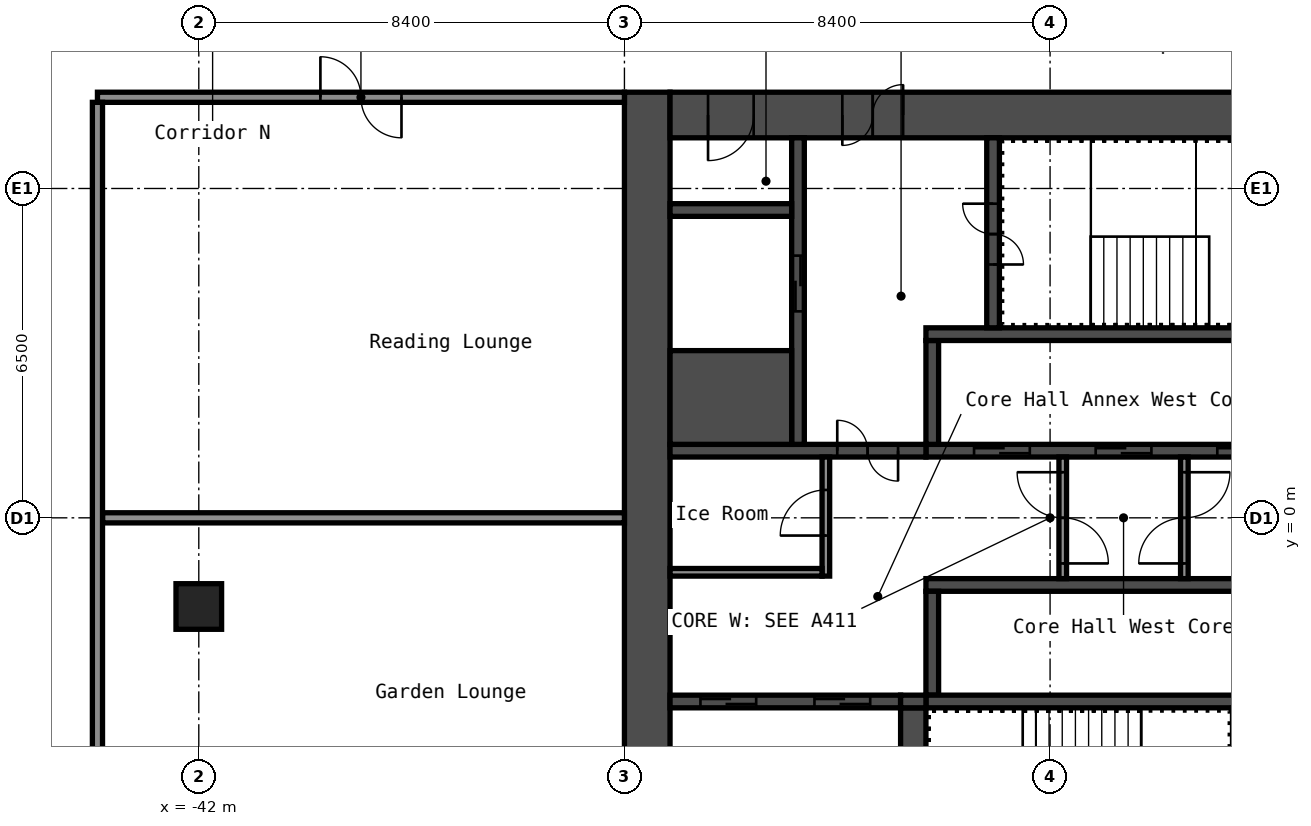
"""IFC4 building model, lengths in metres.
Left out: names, types, materials, properties, quantities, classifications, styles, units other than length and angle.
Written with IfcOpenShell. Run it as: python <this file> out.ifc"""

import sys

from ifc_helpers import new_model, si_unit, direction, frame, frame_2d, origin, origin_2d, place, context, subcontext, project, spatial, rectangle, hollow_rectangle, extrude, element, fill, save


model = new_model("IFC4")
c1 = context("Model", 3, precision=1e-05, world=origin(), true_north=direction((0.0, 1.0)))
c2 = subcontext(c1, "Body", "Model", "MODEL_VIEW")
j1 = project(units=[si_unit("LENGTHUNIT", "METRE"), si_unit("PLANEANGLEUNIT", "RADIAN")], contexts=[c1])
p1 = place(None, origin())
s1 = spatial("IfcSite", under=j1, at=p1, CompositionType="ELEMENT")
p2 = place(p1, origin())
s2 = spatial("IfcBuilding", under=s1, at=p2, CompositionType="ELEMENT")
p3 = place(p2, frame((0.0, 0.0, 69.0)))
s3 = spatial("IfcBuildingStorey", under=s2, at=p3, CompositionType="ELEMENT", Elevation=69.0)
p4 = place(p3, frame((-42.0, -1.75, 0.0), z_axis=(0.0, 0.0, 1.0), x_axis=(1.0, 0.0, 0.0)))
e1 = element("IfcColumn", 1, at=p4, inside=s3, PredefinedType="COLUMN", context=c2, shape_type="SweptSolid", body=[
    extrude(hollow_rectangle(XDim=0.9, YDim=0.9, WallThickness=0.036, at=origin_2d()), origin(), (0.0, 0.0, 1.0), 6.0),
])
p5 = place(p3, frame((-33.15, -8.4, 0.0), z_axis=(0.0, 0.0, 1.0), x_axis=(0.0, 1.0, 0.0)))
e2 = element("IfcWall", 2, at=p5, inside=s3, PredefinedType="SHEAR", context=c2, shape_type="SweptSolid", body=[
    extrude(rectangle(XDim=16.8, YDim=0.9, at=frame_2d((8.4, 0.0))), origin(), (0.0, 0.0, 1.0), 6.0),
])
p6 = place(p3, frame((-32.7, 7.95, 0.0), z_axis=(0.0, 0.0, 1.0), x_axis=(1.0, 0.0, 0.0)))
e3 = element("IfcWall", 3, at=p6, inside=s3, PredefinedType="SHEAR", context=c2, shape_type="SweptSolid", body=[
    extrude(rectangle(XDim=15.0, YDim=0.9, at=frame_2d((7.5, 0.0))), origin(), (0.0, 0.0, 1.0), 6.0),
])
p7 = place(p6, frame((3.4, 0.0, 0.0)))
e4 = element("IfcOpeningElement", 4, at=p7, cuts=e3, PredefinedType="OPENING", context=c2, shape_type="SweptSolid", body=[
    extrude(rectangle(XDim=1.2, YDim=2.1, at=frame_2d((0.6, 1.05))), frame((0.0, 0.46, 0.0), z_axis=(0.0, -1.0, 0.0), x_axis=(1.0, 0.0, 0.0)), (0.0, 0.0, 1.0), 0.92),
])
p8 = place(p6, frame((0.75, 0.0, 0.0)))
e5 = element("IfcOpeningElement", 5, at=p8, cuts=e3, PredefinedType="OPENING", context=c2, shape_type="SweptSolid", body=[
    extrude(rectangle(XDim=0.9, YDim=2.1, at=frame_2d((0.45, 1.05))), frame((0.0, 0.46, 0.0), z_axis=(0.0, -1.0, 0.0), x_axis=(1.0, 0.0, 0.0)), (0.0, 0.0, 1.0), 0.92),
])
p9 = place(p3, frame((-27.65, 1.325, 0.0), z_axis=(0.0, 0.0, 1.0), x_axis=(1.0, 0.0, 0.0)))
e6 = element("IfcWall", 6, at=p9, inside=s3, PredefinedType="SHEAR", context=c2, shape_type="SweptSolid", body=[
    extrude(rectangle(XDim=7.5, YDim=0.25, at=frame_2d((3.75, 0.0))), origin(), (0.0, 0.0, 1.0), 6.0),
])
p10 = place(p9, frame((5.75, 0.0, 0.0)))
e7 = element("IfcOpeningElement", 7, at=p10, cuts=e6, PredefinedType="OPENING", context=c2, shape_type="SweptSolid", body=[
    extrude(rectangle(XDim=1.1, YDim=2.1, at=frame_2d((0.55, 1.05))), frame((0.0, 0.135, 0.0), z_axis=(0.0, -1.0, 0.0), x_axis=(1.0, 0.0, 0.0)), (0.0, 0.0, 1.0), 0.27),
])
p11 = place(p9, frame((3.35, 0.0, 0.0)))
e8 = element("IfcOpeningElement", 8, at=p11, cuts=e6, PredefinedType="OPENING", context=c2, shape_type="SweptSolid", body=[
    extrude(rectangle(XDim=1.1, YDim=2.1, at=frame_2d((0.55, 1.05))), frame((0.0, 0.135, 0.0), z_axis=(0.0, -1.0, 0.0), x_axis=(1.0, 0.0, 0.0)), (0.0, 0.0, 1.0), 0.27),
])
p12 = place(p9, frame((0.95, 0.0, 0.0)))
e9 = element("IfcOpeningElement", 9, at=p12, cuts=e6, PredefinedType="OPENING", context=c2, shape_type="SweptSolid", body=[
    extrude(rectangle(XDim=1.1, YDim=2.1, at=frame_2d((0.55, 1.05))), frame((0.0, 0.135, 0.0), z_axis=(0.0, -1.0, 0.0), x_axis=(1.0, 0.0, 0.0)), (0.0, 0.0, 1.0), 0.27),
])
p13 = place(p3, frame((-27.525, 1.45, 0.0), z_axis=(0.0, 0.0, 1.0), x_axis=(0.0, 1.0, 0.0)))
e10 = element("IfcWall", 10, at=p13, inside=s3, PredefinedType="SHEAR", context=c2, shape_type="SweptSolid", body=[
    extrude(rectangle(XDim=2.05, YDim=0.25, at=frame_2d((1.025, 0.0))), origin(), (0.0, 0.0, 1.0), 6.0),
])
p14 = place(p3, frame((-27.65, 3.625, 0.0), z_axis=(0.0, 0.0, 1.0), x_axis=(1.0, 0.0, 0.0)))
e11 = element("IfcWall", 11, at=p14, inside=s3, PredefinedType="SHEAR", context=c2, shape_type="SweptSolid", body=[
    extrude(rectangle(XDim=7.5, YDim=0.25, at=frame_2d((3.75, 0.0))), origin(), (0.0, 0.0, 1.0), 6.0),
])
p15 = place(p3, frame((-26.325, 3.75, 0.0), z_axis=(0.0, 0.0, 1.0), x_axis=(0.0, 1.0, 0.0)))
e12 = element("IfcWall", 12, at=p15, inside=s3, PredefinedType="SHEAR", context=c2, shape_type="SweptSolid", body=[
    extrude(rectangle(XDim=3.75, YDim=0.25, at=frame_2d((1.875, 0.0))), origin(), (0.0, 0.0, 1.0), 6.0),
])
p16 = place(p15, frame((1.25, 0.0, 0.0)))
e13 = element("IfcOpeningElement", 13, at=p16, cuts=e12, PredefinedType="OPENING", context=c2, shape_type="SweptSolid", body=[
    extrude(rectangle(XDim=1.2, YDim=2.1, at=frame_2d((0.6, 1.05))), frame((0.0, 0.135, 0.0), z_axis=(0.0, -1.0, 0.0), x_axis=(1.0, 0.0, 0.0)), (0.0, 0.0, 1.0), 0.27),
])
p17 = place(p3, frame((-32.7, 1.325, 0.0), z_axis=(0.0, 0.0, 1.0), x_axis=(1.0, 0.0, 0.0)))
e14 = element("IfcWall", 14, at=p17, inside=s3, PredefinedType="SHEAR", context=c2, shape_type="SweptSolid", body=[
    extrude(rectangle(XDim=5.05, YDim=0.25, at=frame_2d((2.525, 0.0))), origin(), (0.0, 0.0, 1.0), 6.0),
])
p18 = place(p17, frame((3.3, 0.0, 0.0)))
e15 = element("IfcOpeningElement", 15, at=p18, cuts=e14, PredefinedType="OPENING", context=c2, shape_type="SweptSolid", body=[
    extrude(rectangle(XDim=1.2, YDim=2.1, at=frame_2d((0.6, 1.05))), frame((0.0, 0.135, 0.0), z_axis=(0.0, -1.0, 0.0), x_axis=(1.0, 0.0, 0.0)), (0.0, 0.0, 1.0), 0.27),
])
p19 = place(p3, frame((-30.175, 1.45, 0.0), z_axis=(0.0, 0.0, 1.0), x_axis=(0.0, 1.0, 0.0)))
e16 = element("IfcWall", 16, at=p19, inside=s3, PredefinedType="SHEAR", context=c2, shape_type="SweptSolid", body=[
    extrude(rectangle(XDim=6.05, YDim=0.25, at=frame_2d((3.025, 0.0))), origin(), (0.0, 0.0, 1.0), 6.0),
])
p20 = place(p19, frame((2.625, 0.0, 0.0)))
e17 = element("IfcOpeningElement", 17, at=p20, cuts=e16, PredefinedType="OPENING", context=c2, shape_type="SweptSolid", body=[
    extrude(rectangle(XDim=1.1, YDim=2.1, at=frame_2d((0.55, 1.05))), frame((0.0, 0.135, 0.0), z_axis=(0.0, -1.0, 0.0), x_axis=(1.0, 0.0, 0.0)), (0.0, 0.0, 1.0), 0.27),
])
p21 = place(p3, frame((-32.7, 2.375, 0.0), z_axis=(0.0, 0.0, 1.0), x_axis=(1.0, 0.0, 0.0)))
e18 = element("IfcWall", 18, at=p21, inside=s3, PredefinedType="SHEAR", context=c2, shape_type="SweptSolid", body=[
    extrude(rectangle(XDim=2.4, YDim=1.85, at=frame_2d((1.2, 0.0))), origin(), (0.0, 0.0, 1.0), 6.0),
])
p22 = place(p3, frame((-32.7, 6.075, 0.0), z_axis=(0.0, 0.0, 1.0), x_axis=(1.0, 0.0, 0.0)))
e19 = element("IfcWall", 19, at=p22, inside=s3, PredefinedType="SHEAR", context=c2, shape_type="SweptSolid", body=[
    extrude(rectangle(XDim=2.4, YDim=0.25, at=frame_2d((1.2, 0.0))), origin(), (0.0, 0.0, 1.0), 6.0),
])
p23 = place(p3, frame((-27.65, -1.325, 0.0), z_axis=(0.0, 0.0, 1.0), x_axis=(1.0, 0.0, 0.0)))
e20 = element("IfcWall", 20, at=p23, inside=s3, PredefinedType="SHEAR", context=c2, shape_type="SweptSolid", body=[
    extrude(rectangle(XDim=7.5, YDim=0.25, at=frame_2d((3.75, 0.0))), origin(), (0.0, 0.0, 1.0), 6.0),
])
p24 = place(p3, frame((-27.525, -3.5, 0.0), z_axis=(0.0, 0.0, 1.0), x_axis=(0.0, 1.0, 0.0)))
e21 = element("IfcWall", 21, at=p24, inside=s3, PredefinedType="SHEAR", context=c2, shape_type="SweptSolid", body=[
    extrude(rectangle(XDim=2.05, YDim=0.25, at=frame_2d((1.025, 0.0))), origin(), (0.0, 0.0, 1.0), 6.0),
])
p25 = place(p3, frame((-27.65, -3.625, 0.0), z_axis=(0.0, 0.0, 1.0), x_axis=(1.0, 0.0, 0.0)))
e22 = element("IfcWall", 22, at=p25, inside=s3, PredefinedType="SHEAR", context=c2, shape_type="SweptSolid", body=[
    extrude(rectangle(XDim=7.5, YDim=0.25, at=frame_2d((3.75, 0.0))), origin(), (0.0, 0.0, 1.0), 6.0),
])
p26 = place(p3, frame((-27.9, -7.5, 0.0), z_axis=(0.0, 0.0, 1.0), x_axis=(0.0, 1.0, 0.0)))
e23 = element("IfcWall", 23, at=p26, inside=s3, PredefinedType="SHEAR", context=c2, shape_type="SweptSolid", body=[
    extrude(rectangle(XDim=3.75, YDim=0.5, at=frame_2d((1.875, 0.0))), origin(), (0.0, 0.0, 1.0), 6.0),
])
p27 = place(p3, frame((-32.7, -3.625, 0.0), z_axis=(0.0, 0.0, 1.0), x_axis=(1.0, 0.0, 0.0)))
e24 = element("IfcWall", 24, at=p27, inside=s3, PredefinedType="SHEAR", context=c2, shape_type="SweptSolid", body=[
    extrude(rectangle(XDim=4.55, YDim=0.25, at=frame_2d((2.275, 0.0))), origin(), (0.0, 0.0, 1.0), 6.0),
])
p28 = place(p27, frame((2.85, 0.0, 0.0)))
e25 = element("IfcOpeningElement", 25, at=p28, cuts=e24, PredefinedType="OPENING", context=c2, shape_type="SweptSolid", body=[
    extrude(rectangle(XDim=1.1, YDim=2.1, at=frame_2d((0.55, 1.05))), frame((0.0, 0.135, 0.0), z_axis=(0.0, -1.0, 0.0), x_axis=(1.0, 0.0, 0.0)), (0.0, 0.0, 1.0), 0.27),
])
p29 = place(p27, frame((0.6, 0.0, 0.0)))
e26 = element("IfcOpeningElement", 26, at=p29, cuts=e24, PredefinedType="OPENING", context=c2, shape_type="SweptSolid", body=[
    extrude(rectangle(XDim=1.1, YDim=2.1, at=frame_2d((0.55, 1.05))), frame((0.0, 0.135, 0.0), z_axis=(0.0, -1.0, 0.0), x_axis=(1.0, 0.0, 0.0)), (0.0, 0.0, 1.0), 0.27),
])
p30 = place(p3, frame((-28.15, -3.625, 0.0), z_axis=(0.0, 0.0, 1.0), x_axis=(1.0, 0.0, 0.0)))
e27 = element("IfcWall", 27, at=p30, inside=s3, PredefinedType="SHEAR", context=c2, shape_type="SweptSolid", body=[
    extrude(rectangle(XDim=0.5, YDim=0.25, at=frame_2d((0.25, 0.0))), origin(), (0.0, 0.0, 1.0), 6.0),
])
p31 = place(p3, frame((-22.55, -1.2, 0.0), z_axis=(0.0, 0.0, 1.0), x_axis=(0.0, 1.0, 0.0)))
e28 = element("IfcWall", 28, at=p31, inside=s3, PredefinedType="PARTITIONING", context=c2, shape_type="SweptSolid", body=[
    extrude(rectangle(XDim=2.4, YDim=0.15, at=frame_2d((1.2, 0.0))), origin(), (0.0, 0.0, 1.0), 6.0),
])
p32 = place(p31, frame((0.3, 0.0, 0.0)))
e29 = element("IfcOpeningElement", 29, at=p32, cuts=e28, PredefinedType="OPENING", context=c2, shape_type="SweptSolid", body=[
    extrude(rectangle(XDim=1.8, YDim=2.1, at=frame_2d((0.9, 1.05))), frame((0.0, 0.085, 0.0), z_axis=(0.0, -1.0, 0.0), x_axis=(1.0, 0.0, 0.0)), (0.0, 0.0, 1.0), 0.17),
])
p33 = place(p3, frame((-24.95, -1.2, 0.0), z_axis=(0.0, 0.0, 1.0), x_axis=(0.0, 1.0, 0.0)))
e30 = element("IfcWall", 30, at=p33, inside=s3, PredefinedType="PARTITIONING", context=c2, shape_type="SweptSolid", body=[
    extrude(rectangle(XDim=2.4, YDim=0.15, at=frame_2d((1.2, 0.0))), origin(), (0.0, 0.0, 1.0), 6.0),
])
p34 = place(p33, frame((0.3, 0.0, 0.0)))
e31 = element("IfcOpeningElement", 31, at=p34, cuts=e30, PredefinedType="OPENING", context=c2, shape_type="SweptSolid", body=[
    extrude(rectangle(XDim=1.8, YDim=2.1, at=frame_2d((0.9, 1.05))), frame((0.0, 0.085, 0.0), z_axis=(0.0, -1.0, 0.0), x_axis=(1.0, 0.0, 0.0)), (0.0, 0.0, 1.0), 0.17),
])
p35 = place(p3, frame((-29.625, -1.15, 0.0), z_axis=(0.0, 0.0, 1.0), x_axis=(0.0, 1.0, 0.0)))
e32 = element("IfcWall", 32, at=p35, inside=s3, PredefinedType="PARTITIONING", context=c2, shape_type="SweptSolid", body=[
    extrude(rectangle(XDim=2.35, YDim=0.15, at=frame_2d((1.175, 0.0))), origin(), (0.0, 0.0, 1.0), 6.0),
])
p36 = place(p35, frame((0.8, 0.0, 0.0)))
e33 = element("IfcOpeningElement", 33, at=p36, cuts=e32, PredefinedType="OPENING", context=c2, shape_type="SweptSolid", body=[
    extrude(rectangle(XDim=0.9, YDim=2.1, at=frame_2d((0.45, 1.05))), frame((0.0, 0.085, 0.0), z_axis=(0.0, -1.0, 0.0), x_axis=(1.0, 0.0, 0.0)), (0.0, 0.0, 1.0), 0.17),
])
p37 = place(p3, frame((-32.7, -1.075, 0.0), z_axis=(0.0, 0.0, 1.0), x_axis=(1.0, 0.0, 0.0)))
e34 = element("IfcWall", 34, at=p37, inside=s3, PredefinedType="PARTITIONING", context=c2, shape_type="SweptSolid", body=[
    extrude(rectangle(XDim=3.0, YDim=0.15, at=frame_2d((1.5, 0.0))), origin(), (0.0, 0.0, 1.0), 6.0),
])
p38 = place(p3, frame((-43.9, 0.0, 0.0), z_axis=(0.0, 0.0, 1.0), x_axis=(1.0, 0.0, 0.0)))
e35 = element("IfcWall", 35, at=p38, inside=s3, PredefinedType="PARTITIONING", context=c2, shape_type="SweptSolid", body=[
    extrude(rectangle(XDim=10.3, YDim=0.2, at=frame_2d((5.15, 0.0))), origin(), (0.0, 0.0, 1.0), 6.0),
])
p39 = place(p3, frame((-44.0, 8.3, 0.0), z_axis=(0.0, 0.0, 1.0), x_axis=(1.0, 0.0, 0.0)))
e36 = element("IfcWall", 36, at=p39, inside=s3, PredefinedType="PARTITIONING", context=c2, shape_type="SweptSolid", body=[
    extrude(rectangle(XDim=10.4, YDim=0.2, at=frame_2d((5.2, 0.0))), origin(), (0.0, 0.0, 1.0), 6.0),
])
p40 = place(p39, frame((4.4, 0.0, 0.0)))
e37 = element("IfcOpeningElement", 37, at=p40, cuts=e36, PredefinedType="OPENING", context=c2, shape_type="SweptSolid", body=[
    extrude(rectangle(XDim=1.6, YDim=2.1, at=frame_2d((0.8, 1.05))), frame((0.0, 0.11, 0.0), z_axis=(0.0, -1.0, 0.0), x_axis=(1.0, 0.0, 0.0)), (0.0, 0.0, 1.0), 0.22),
])
p41 = place(p3, frame((-44.0, -8.2, 0.0), z_axis=(0.0, 0.0, 1.0), x_axis=(0.0, 1.0, 0.0)))
e38 = element("IfcWall", 38, at=p41, inside=s3, PredefinedType="PARTITIONING", context=c2, shape_type="SweptSolid", body=[
    extrude(rectangle(XDim=16.4, YDim=0.2, at=frame_2d((8.2, 0.0))), origin(), (0.0, 0.0, 1.0), 6.0),
])
p42 = place(p7, origin())
e39 = element("IfcDoor", 39, at=p42, inside=s3, OperationType="DOUBLE_DOOR_SINGLE_SWING", PredefinedType="DOOR", context=c2, shape_type="SweptSolid", body=[
    extrude(rectangle(XDim=1.2, YDim=2.1, at=frame_2d((0.6, 1.05))), frame((0.0, 0.025, 0.0), z_axis=(0.0, -1.0, 0.0), x_axis=(1.0, 0.0, 0.0)), (0.0, 0.0, 1.0), 0.05),
])
fill(e4, e39)
p43 = place(p8, origin())
e40 = element("IfcDoor", 40, at=p43, inside=s3, OperationType="SINGLE_SWING_LEFT", PredefinedType="DOOR", context=c2, shape_type="SweptSolid", body=[
    extrude(rectangle(XDim=0.9, YDim=2.1, at=frame_2d((0.45, 1.05))), frame((0.0, 0.025, 0.0), z_axis=(0.0, -1.0, 0.0), x_axis=(1.0, 0.0, 0.0)), (0.0, 0.0, 1.0), 0.05),
])
fill(e5, e40)
p44 = place(p16, origin())
e41 = element("IfcDoor", 41, at=p44, inside=s3, OperationType="DOUBLE_DOOR_SINGLE_SWING", PredefinedType="DOOR", context=c2, shape_type="SweptSolid", body=[
    extrude(rectangle(XDim=1.2, YDim=2.1, at=frame_2d((0.6, 1.05))), frame((0.0, 0.025, 0.0), z_axis=(0.0, -1.0, 0.0), x_axis=(1.0, 0.0, 0.0)), (0.0, 0.0, 1.0), 0.05),
])
fill(e13, e41)
p45 = place(p18, origin())
e42 = element("IfcDoor", 42, at=p45, inside=s3, OperationType="DOUBLE_DOOR_SINGLE_SWING", PredefinedType="DOOR", context=c2, shape_type="SweptSolid", body=[
    extrude(rectangle(XDim=1.2, YDim=2.1, at=frame_2d((0.6, 1.05))), frame((0.0, 0.025, 0.0), z_axis=(0.0, -1.0, 0.0), x_axis=(1.0, 0.0, 0.0)), (0.0, 0.0, 1.0), 0.05),
])
fill(e15, e42)
p46 = place(p32, origin())
e43 = element("IfcDoor", 43, at=p46, inside=s3, OperationType="DOUBLE_DOOR_SINGLE_SWING", PredefinedType="DOOR", context=c2, shape_type="SweptSolid", body=[
    extrude(rectangle(XDim=1.8, YDim=2.1, at=frame_2d((0.9, 1.05))), frame((0.0, 0.025, 0.0), z_axis=(0.0, -1.0, 0.0), x_axis=(1.0, 0.0, 0.0)), (0.0, 0.0, 1.0), 0.05),
])
fill(e29, e43)
p47 = place(p34, origin())
e44 = element("IfcDoor", 44, at=p47, inside=s3, OperationType="DOUBLE_DOOR_SINGLE_SWING", PredefinedType="DOOR", context=c2, shape_type="SweptSolid", body=[
    extrude(rectangle(XDim=1.8, YDim=2.1, at=frame_2d((0.9, 1.05))), frame((0.0, 0.025, 0.0), z_axis=(0.0, -1.0, 0.0), x_axis=(1.0, 0.0, 0.0)), (0.0, 0.0, 1.0), 0.05),
])
fill(e31, e44)
p48 = place(p36, origin())
e45 = element("IfcDoor", 45, at=p48, inside=s3, OperationType="SINGLE_SWING_RIGHT", PredefinedType="DOOR", context=c2, shape_type="SweptSolid", body=[
    extrude(rectangle(XDim=0.9, YDim=2.1, at=frame_2d((0.45, 1.05))), frame((0.0, 0.025, 0.0), z_axis=(0.0, -1.0, 0.0), x_axis=(1.0, 0.0, 0.0)), (0.0, 0.0, 1.0), 0.05),
])
fill(e33, e45)
p49 = place(p10, origin())
e46 = element("IfcDoor", 46, at=p49, inside=s3, OperationType="DOUBLE_DOOR_SLIDING", PredefinedType="DOOR", context=c2, shape_type="SweptSolid", body=[
    extrude(rectangle(XDim=1.1, YDim=2.1, at=frame_2d((0.55, 1.05))), frame((0.0, 0.025, 0.0), z_axis=(0.0, -1.0, 0.0), x_axis=(1.0, 0.0, 0.0)), (0.0, 0.0, 1.0), 0.05),
])
fill(e7, e46)
p50 = place(p11, origin())
e47 = element("IfcDoor", 47, at=p50, inside=s3, OperationType="DOUBLE_DOOR_SLIDING", PredefinedType="DOOR", context=c2, shape_type="SweptSolid", body=[
    extrude(rectangle(XDim=1.1, YDim=2.1, at=frame_2d((0.55, 1.05))), frame((0.0, 0.025, 0.0), z_axis=(0.0, -1.0, 0.0), x_axis=(1.0, 0.0, 0.0)), (0.0, 0.0, 1.0), 0.05),
])
fill(e8, e47)
p51 = place(p12, origin())
e48 = element("IfcDoor", 48, at=p51, inside=s3, OperationType="DOUBLE_DOOR_SLIDING", PredefinedType="DOOR", context=c2, shape_type="SweptSolid", body=[
    extrude(rectangle(XDim=1.1, YDim=2.1, at=frame_2d((0.55, 1.05))), frame((0.0, 0.025, 0.0), z_axis=(0.0, -1.0, 0.0), x_axis=(1.0, 0.0, 0.0)), (0.0, 0.0, 1.0), 0.05),
])
fill(e9, e48)
p52 = place(p20, origin())
e49 = element("IfcDoor", 49, at=p52, inside=s3, OperationType="DOUBLE_DOOR_SLIDING", PredefinedType="DOOR", context=c2, shape_type="SweptSolid", body=[
    extrude(rectangle(XDim=1.1, YDim=2.1, at=frame_2d((0.55, 1.05))), frame((0.0, 0.025, 0.0), z_axis=(0.0, -1.0, 0.0), x_axis=(1.0, 0.0, 0.0)), (0.0, 0.0, 1.0), 0.05),
])
fill(e17, e49)
p53 = place(p28, origin())
e50 = element("IfcDoor", 50, at=p53, inside=s3, OperationType="DOUBLE_DOOR_SLIDING", PredefinedType="DOOR", context=c2, shape_type="SweptSolid", body=[
    extrude(rectangle(XDim=1.1, YDim=2.1, at=frame_2d((0.55, 1.05))), frame((0.0, 0.025, 0.0), z_axis=(0.0, -1.0, 0.0), x_axis=(1.0, 0.0, 0.0)), (0.0, 0.0, 1.0), 0.05),
])
fill(e25, e50)
p54 = place(p29, origin())
e51 = element("IfcDoor", 51, at=p54, inside=s3, OperationType="DOUBLE_DOOR_SLIDING", PredefinedType="DOOR", context=c2, shape_type="SweptSolid", body=[
    extrude(rectangle(XDim=1.1, YDim=2.1, at=frame_2d((0.55, 1.05))), frame((0.0, 0.025, 0.0), z_axis=(0.0, -1.0, 0.0), x_axis=(1.0, 0.0, 0.0)), (0.0, 0.0, 1.0), 0.05),
])
fill(e26, e51)
p55 = place(p40, origin())
e52 = element("IfcDoor", 52, at=p55, inside=s3, OperationType="DOUBLE_DOOR_SINGLE_SWING", PredefinedType="DOOR", context=c2, shape_type="SweptSolid", body=[
    extrude(rectangle(XDim=1.6, YDim=2.1, at=frame_2d((0.8, 1.05))), frame((0.0, 0.025, 0.0), z_axis=(0.0, -1.0, 0.0), x_axis=(1.0, 0.0, 0.0)), (0.0, 0.0, 1.0), 0.05),
])
fill(e37, e52)
save(model, sys.argv[1])
